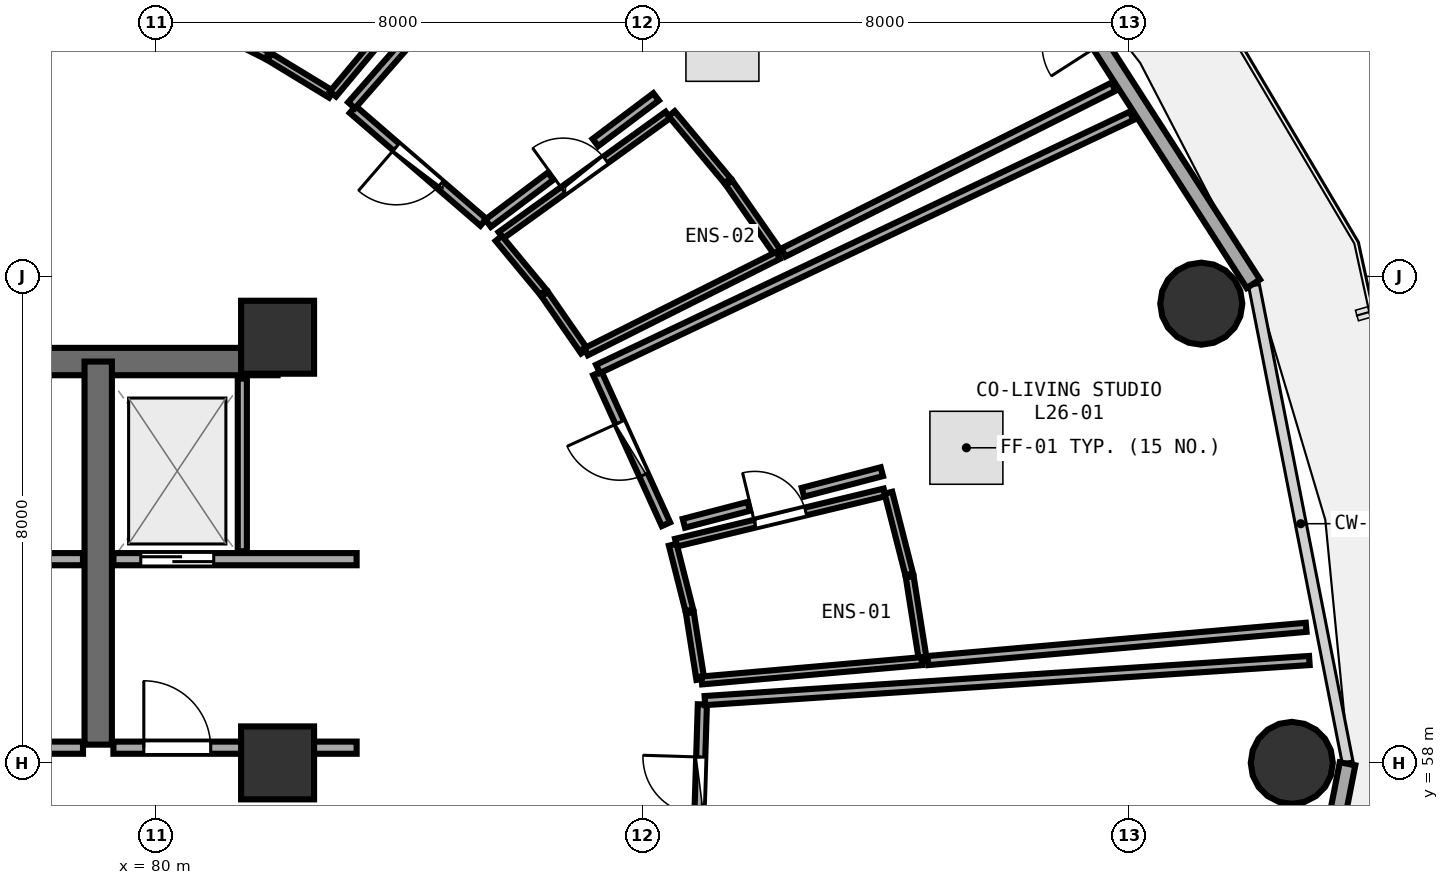
"""IFC4 building model, lengths in metres.
Left out: names, types, materials, properties, quantities, classifications, styles, units other than length and angle.
Written with IfcOpenShell. Run it as: python <this file> out.ifc"""

import sys

from ifc_helpers import new_model, si_unit, direction, frame, frame_2d, origin, origin_2d, place, context, subcontext, project, spatial, rectangle, circle, extrude, element, fill, save


model = new_model("IFC4")
c1 = context("Model", 3, precision=1e-05, world=origin(), true_north=direction((0.0, 1.0)))
c2 = subcontext(c1, "Body", "Model", "MODEL_VIEW")
j1 = project(units=[si_unit("LENGTHUNIT", "METRE"), si_unit("PLANEANGLEUNIT", "RADIAN")], contexts=[c1])
p1 = place(None, origin())
s1 = spatial("IfcSite", under=j1, at=p1, CompositionType="ELEMENT")
p2 = place(p1, origin())
s2 = spatial("IfcBuilding", under=s1, at=p2, CompositionType="ELEMENT")
p3 = place(p2, frame((0.0, 0.0, 102.6)))
s3 = spatial("IfcBuildingStorey", under=s2, at=p3, CompositionType="ELEMENT", Elevation=102.6)
for number, where, z_axis, x_axis in (
    (1, (82.0, 58.0, 0.0), (0.0, 0.0, 1.0), (1.0, 0.0, 0.0)),
    (2, (82.0, 65.0, 0.0), (0.0, 0.0, 1.0), (1.0, 0.0, 0.0)),
):
    element("IfcColumn", number, at=place(p3, frame(where, z_axis=z_axis, x_axis=x_axis)), inside=s3, PredefinedType="PILASTER", context=c2, shape_type="SweptSolid", body=[
        extrude(rectangle(XDim=1.2, YDim=1.2, at=origin_2d()), origin(), (0.0, 0.0, 1.0), 3.75),
    ])
for number, where, z_axis, x_axis in (
    (3, (98.68, 58.0, 0.0), (0.0, 0.0, 1.0), (1.0, 0.0, 0.0)),
    (4, (97.192, 65.552, 0.0), (0.0, 0.0, 1.0), (1.0, 0.0, 0.0)),
):
    element("IfcColumn", number, at=place(p3, frame(where, z_axis=z_axis, x_axis=x_axis)), inside=s3, PredefinedType="COLUMN", context=c2, shape_type="SweptSolid", body=[
        extrude(circle(Radius=0.675, at=origin_2d()), origin(), (0.0, 0.0, 1.0), 3.75),
    ])
p4 = place(p3, frame((98.048, 65.879, 0.0), z_axis=(0.0, 0.0, 1.0), x_axis=(-0.540620528459, 0.841266571432, 0.0)))
e5 = element("IfcWall", 5, at=p4, inside=s3, PredefinedType="SOLIDWALL", context=c2, shape_type="SweptSolid", body=[
    extrude(rectangle(XDim=8.193, YDim=0.26, at=frame_2d((4.096, 0.0))), origin(), (0.0, 0.0, 1.0), 3.475),
])
p5 = place(p4, frame((4.671, 0.0, 0.0)))
e6 = element("IfcOpeningElement", 6, at=p5, cuts=e5, PredefinedType="OPENING", context=c2, shape_type="SweptSolid", body=[
    extrude(rectangle(XDim=0.95, YDim=2.1, at=frame_2d((0.475, 1.05))), frame((0.0, 0.14, 0.0), z_axis=(0.0, -1.0, 0.0), x_axis=(1.0, 0.0, 0.0)), (0.0, 0.0, 1.0), 0.28),
])
p6 = place(p4, frame((5.971, 0.0, 0.85)))
e7 = element("IfcOpeningElement", 7, at=p6, cuts=e5, PredefinedType="OPENING", context=c2, shape_type="SweptSolid", body=[
    extrude(rectangle(XDim=1.2, YDim=1.45, at=frame_2d((0.6, 0.725))), frame((0.0, 0.14, 0.0), z_axis=(0.0, -1.0, 0.0), x_axis=(1.0, 0.0, 0.0)), (0.0, 0.0, 1.0), 0.28),
])
p7 = place(p3, frame((98.059, 50.148, 0.0), z_axis=(0.0, 0.0, 1.0), x_axis=(0.192581843632, 0.981280914674, 0.0)))
e8 = element("IfcWall", 8, at=p7, inside=s3, PredefinedType="SOLIDWALL", context=c2, shape_type="SweptSolid", body=[
    extrude(rectangle(XDim=7.987, YDim=0.26, at=frame_2d((3.993, 0.0))), origin(), (0.0, 0.0, 1.0), 3.475),
])
p8 = place(p7, frame((3.193, 0.0, 0.85)))
e9 = element("IfcOpeningElement", 9, at=p8, cuts=e8, PredefinedType="OPENING", context=c2, shape_type="SweptSolid", body=[
    extrude(rectangle(XDim=1.6, YDim=1.45, at=frame_2d((0.8, 0.725))), frame((0.0, 0.14, 0.0), z_axis=(0.0, -1.0, 0.0), x_axis=(1.0, 0.0, 0.0)), (0.0, 0.0, 1.0), 0.28),
])
p9 = place(p3, frame((74.0, 64.6, 0.0), z_axis=(0.0, 0.0, 1.0), x_axis=(1.0, 0.0, 0.0)))
e10 = element("IfcWall", 10, at=p9, inside=s3, PredefinedType="SHEAR", context=c2, shape_type="SweptSolid", body=[
    extrude(rectangle(XDim=8.0, YDim=0.45, at=frame_2d((4.0, 0.0))), origin(), (0.0, 0.0, 1.0), 3.49),
])
p10 = place(p3, frame((79.05, 58.3, 0.0), z_axis=(0.0, 0.0, 1.0), x_axis=(0.0, 1.0, 0.0)))
e11 = element("IfcWall", 11, at=p10, inside=s3, PredefinedType="SHEAR", context=c2, shape_type="SweptSolid", body=[
    extrude(rectangle(XDim=6.3, YDim=0.45, at=frame_2d((3.15, 0.0))), origin(), (0.0, 0.0, 1.0), 3.49),
])
p11 = place(p3, frame((74.2, 61.35, 0.0), z_axis=(0.0, 0.0, 1.0), x_axis=(1.0, 0.0, 0.0)))
e12 = element("IfcWall", 12, at=p11, inside=s3, PredefinedType="SOLIDWALL", context=c2, shape_type="SweptSolid", body=[
    extrude(rectangle(XDim=4.6, YDim=0.2, at=frame_2d((2.3, 0.0))), origin(), (0.0, 0.0, 1.0), 3.48),
])
p12 = place(p11, frame((0.52, 0.0, 0.0)))
e13 = element("IfcOpeningElement", 13, at=p12, cuts=e12, PredefinedType="OPENING", context=c2, shape_type="SweptSolid", body=[
    extrude(rectangle(XDim=1.2, YDim=2.15, at=frame_2d((0.6, 1.075))), frame((0.0, 0.11, 0.0), z_axis=(0.0, -1.0, 0.0), x_axis=(1.0, 0.0, 0.0)), (0.0, 0.0, 1.0), 0.22),
])
p13 = place(p3, frame((79.3, 61.35, 0.0), z_axis=(0.0, 0.0, 1.0), x_axis=(1.0, 0.0, 0.0)))
e14 = element("IfcWall", 14, at=p13, inside=s3, PredefinedType="SOLIDWALL", context=c2, shape_type="SweptSolid", body=[
    extrude(rectangle(XDim=4.0, YDim=0.2, at=frame_2d((2.0, 0.0))), origin(), (0.0, 0.0, 1.0), 2.775),
])
p14 = place(p13, frame((0.45, 0.0, 0.0)))
e15 = element("IfcOpeningElement", 15, at=p14, cuts=e14, PredefinedType="OPENING", context=c2, shape_type="SweptSolid", body=[
    extrude(rectangle(XDim=1.2, YDim=2.15, at=frame_2d((0.6, 1.075))), frame((0.0, 0.11, 0.0), z_axis=(0.0, -1.0, 0.0), x_axis=(1.0, 0.0, 0.0)), (0.0, 0.0, 1.0), 0.22),
])
p15 = place(p3, frame((81.42, 61.48, 0.0), z_axis=(0.0, 0.0, 1.0), x_axis=(0.0, 1.0, 0.0)))
e16 = element("IfcWall", 16, at=p15, inside=s3, PredefinedType="PARTITIONING", context=c2, shape_type="SweptSolid", body=[
    extrude(rectangle(XDim=2.84, YDim=0.15, at=frame_2d((1.42, 0.0))), origin(), (0.0, 0.0, 1.0), 3.48),
])
p16 = place(p3, frame((74.2, 58.25, 0.0), z_axis=(0.0, 0.0, 1.0), x_axis=(1.0, 0.0, 0.0)))
e17 = element("IfcWall", 17, at=p16, inside=s3, PredefinedType="SOLIDWALL", context=c2, shape_type="SweptSolid", body=[
    extrude(rectangle(XDim=4.6, YDim=0.2, at=frame_2d((2.3, 0.0))), origin(), (0.0, 0.0, 1.0), 3.48),
])
p17 = place(p16, frame((1.8, 0.0, 0.0)))
e18 = element("IfcOpeningElement", 18, at=p17, cuts=e17, PredefinedType="OPENING", context=c2, shape_type="SweptSolid", body=[
    extrude(rectangle(XDim=1.1, YDim=2.1, at=frame_2d((0.55, 1.05))), frame((0.0, 0.11, 0.0), z_axis=(0.0, -1.0, 0.0), x_axis=(1.0, 0.0, 0.0)), (0.0, 0.0, 1.0), 0.22),
])
p18 = place(p3, frame((79.3, 58.25, 0.0), z_axis=(0.0, 0.0, 1.0), x_axis=(1.0, 0.0, 0.0)))
e19 = element("IfcWall", 19, at=p18, inside=s3, PredefinedType="SOLIDWALL", context=c2, shape_type="SweptSolid", body=[
    extrude(rectangle(XDim=4.0, YDim=0.2, at=frame_2d((2.0, 0.0))), origin(), (0.0, 0.0, 1.0), 2.775),
])
p19 = place(p18, frame((0.5, 0.0, 0.0)))
e20 = element("IfcOpeningElement", 20, at=p19, cuts=e19, PredefinedType="OPENING", context=c2, shape_type="SweptSolid", body=[
    extrude(rectangle(XDim=1.1, YDim=2.1, at=frame_2d((0.55, 1.05))), frame((0.0, 0.11, 0.0), z_axis=(0.0, -1.0, 0.0), x_axis=(1.0, 0.0, 0.0)), (0.0, 0.0, 1.0), 0.22),
])
p20 = place(p3, frame((88.552, 61.621, 0.0), z_axis=(0.0, 0.0, 1.0), x_axis=(0.972155080707, 0.234338428465, 0.0)))
e21 = element("IfcWall", 21, at=p20, inside=s3, PredefinedType="PLUMBINGWALL", context=c2, shape_type="SweptSolid", body=[
    extrude(rectangle(XDim=3.529, YDim=0.13, at=frame_2d((1.764, 0.0))), origin(), (0.0, 0.0, 1.0), 3.175),
])
p21 = place(p20, frame((1.334, 0.0, 0.0)))
e22 = element("IfcOpeningElement", 22, at=p21, cuts=e21, PredefinedType="OPENING", context=c2, shape_type="SweptSolid", body=[
    extrude(rectangle(XDim=0.86, YDim=2.05, at=frame_2d((0.43, 1.025))), frame((0.0, 0.075, 0.0), z_axis=(0.0, -1.0, 0.0), x_axis=(1.0, 0.0, 0.0)), (0.0, 0.0, 1.0), 0.15),
])
p22 = place(p3, frame((88.387, 61.925, 0.0), z_axis=(0.0, 0.0, 1.0), x_axis=(-0.413748987938, 0.910391001153, 0.0)))
e23 = element("IfcWall", 23, at=p22, inside=s3, PredefinedType="PARTITIONING", context=c2, shape_type="SweptSolid", body=[
    extrude(rectangle(XDim=2.727, YDim=0.15, at=frame_2d((1.364, 0.0))), origin(), (0.0, 0.0, 1.0), 3.235),
])
p23 = place(p22, frame((0.889, 0.0, 0.0)))
e24 = element("IfcOpeningElement", 24, at=p23, cuts=e23, PredefinedType="OPENING", context=c2, shape_type="SweptSolid", body=[
    extrude(rectangle(XDim=0.95, YDim=2.08, at=frame_2d((0.475, 1.04))), frame((0.0, 0.085, 0.0), z_axis=(0.0, -1.0, 0.0), x_axis=(1.0, 0.0, 0.0)), (0.0, 0.0, 1.0), 0.17),
])
p24 = place(p3, frame((85.673, 66.676, 0.0), z_axis=(0.0, 0.0, 1.0), x_axis=(0.811192287952, 0.584779507137, 0.0)))
e25 = element("IfcWall", 25, at=p24, inside=s3, PredefinedType="PLUMBINGWALL", context=c2, shape_type="SweptSolid", body=[
    extrude(rectangle(XDim=3.386, YDim=0.13, at=frame_2d((1.693, 0.0))), origin(), (0.0, 0.0, 1.0), 3.235),
])
p25 = place(p24, frame((1.263, 0.0, 0.0)))
e26 = element("IfcOpeningElement", 26, at=p25, cuts=e25, PredefinedType="OPENING", context=c2, shape_type="SweptSolid", body=[
    extrude(rectangle(XDim=0.86, YDim=2.05, at=frame_2d((0.43, 1.025))), frame((0.0, 0.075, 0.0), z_axis=(0.0, -1.0, 0.0), x_axis=(1.0, 0.0, 0.0)), (0.0, 0.0, 1.0), 0.15),
])
p26 = place(p3, frame((85.385, 66.89, 0.0), z_axis=(0.0, 0.0, 1.0), x_axis=(-0.756913909666, 0.65351460072, 0.0)))
e27 = element("IfcWall", 27, at=p26, inside=s3, PredefinedType="PARTITIONING", context=c2, shape_type="SweptSolid", body=[
    extrude(rectangle(XDim=2.838, YDim=0.15, at=frame_2d((1.419, 0.0))), origin(), (0.0, 0.0, 1.0), 2.925),
])
p27 = place(p26, frame((0.944, 0.0, 0.0)))
e28 = element("IfcOpeningElement", 28, at=p27, cuts=e27, PredefinedType="OPENING", context=c2, shape_type="SweptSolid", body=[
    extrude(rectangle(XDim=0.95, YDim=2.08, at=frame_2d((0.475, 1.04))), frame((0.0, 0.085, 0.0), z_axis=(0.0, -1.0, 0.0), x_axis=(1.0, 0.0, 0.0)), (0.0, 0.0, 1.0), 0.17),
])
p28 = place(p3, frame((88.903, 56.28, 0.0), z_axis=(0.0, 0.0, 1.0), x_axis=(0.031027384649, 0.999518534797, 0.0)))
e29 = element("IfcWall", 29, at=p28, inside=s3, PredefinedType="PARTITIONING", context=c2, shape_type="SweptSolid", body=[
    extrude(rectangle(XDim=2.683, YDim=0.15, at=frame_2d((1.342, 0.0))), origin(), (0.0, 0.0, 1.0), 2.925),
])
p29 = place(p28, frame((0.867, 0.0, 0.0)))
e30 = element("IfcOpeningElement", 30, at=p29, cuts=e29, PredefinedType="OPENING", context=c2, shape_type="SweptSolid", body=[
    extrude(rectangle(XDim=0.95, YDim=2.08, at=frame_2d((0.475, 1.04))), frame((0.0, 0.085, 0.0), z_axis=(0.0, -1.0, 0.0), x_axis=(1.0, 0.0, 0.0)), (0.0, 0.0, 1.0), 0.17),
])
p30 = place(p3, frame((88.953, 59.374, 0.0), z_axis=(0.0, 0.0, 1.0), x_axis=(-0.15586083115, 0.987779024536, 0.0)))
e31 = element("IfcWall", 31, at=p30, inside=s3, PredefinedType="PLUMBINGWALL", context=c2, shape_type="SweptSolid", body=[
    extrude(rectangle(XDim=1.109, YDim=0.13, at=frame_2d((0.555, 0.0))), origin(), (0.0, 0.0, 1.0), 3.48),
])
p31 = place(p3, frame((88.772, 60.508, 0.0), z_axis=(0.0, 0.0, 1.0), x_axis=(-0.245578364709, 0.96937674141, 0.0)))
e32 = element("IfcWall", 32, at=p31, inside=s3, PredefinedType="PLUMBINGWALL", context=c2, shape_type="SweptSolid", body=[
    extrude(rectangle(XDim=1.114, YDim=0.13, at=frame_2d((0.557, 0.0))), origin(), (0.0, 0.0, 1.0), 3.48),
])
p32 = place(p3, frame((92.046, 62.443, 0.0), z_axis=(0.0, 0.0, 1.0), x_axis=(0.246925879087, -0.969034369998, 0.0)))
e33 = element("IfcWall", 33, at=p32, inside=s3, PredefinedType="PLUMBINGWALL", context=c2, shape_type="SweptSolid", body=[
    extrude(rectangle(XDim=1.386, YDim=0.13, at=frame_2d((0.693, 0.0))), origin(), (0.0, 0.0, 1.0), 3.48),
])
p33 = place(p3, frame((92.396, 61.06, 0.0), z_axis=(0.0, 0.0, 1.0), x_axis=(0.156116740912, -0.987738610771, 0.0)))
e34 = element("IfcWall", 34, at=p33, inside=s3, PredefinedType="PLUMBINGWALL", context=c2, shape_type="SweptSolid", body=[
    extrude(rectangle(XDim=1.382, YDim=0.13, at=frame_2d((0.691, 0.0))), origin(), (0.0, 0.0, 1.0), 3.48),
])
p34 = place(p3, frame((92.595, 59.673, 0.0), z_axis=(0.0, 0.0, 1.0), x_axis=(-0.996171439416, -0.087421183317, 0.0)))
e35 = element("IfcWall", 35, at=p34, inside=s3, PredefinedType="PLUMBINGWALL", context=c2, shape_type="SweptSolid", body=[
    extrude(rectangle(XDim=3.633, YDim=0.13, at=frame_2d((1.817, 0.0))), origin(), (0.0, 0.0, 1.0), 3.175),
])
p35 = place(p3, frame((87.27, 64.479, 0.0), z_axis=(0.0, 0.0, 1.0), x_axis=(0.903543765611, 0.428495815178, 0.0)))
e36 = element("IfcWall", 36, at=p35, inside=s3, PredefinedType="PARTITIONING", context=c2, shape_type="SweptSolid", body=[
    extrude(rectangle(XDim=9.713, YDim=0.15, at=frame_2d((4.856, 0.0))), origin(), (0.0, 0.0, 1.0), 2.925),
])
p36 = place(p3, frame((98.916, 60.229, 0.0), z_axis=(0.0, 0.0, 1.0), x_axis=(-0.996158887303, -0.08756409793, 0.0)))
e37 = element("IfcWall", 37, at=p36, inside=s3, PredefinedType="PARTITIONING", context=c2, shape_type="SweptSolid", body=[
    extrude(rectangle(XDim=6.245, YDim=0.15, at=frame_2d((3.123, 0.0))), origin(), (0.0, 0.0, 1.0), 2.975),
])
p37 = place(p3, frame((91.938, 62.789, 0.0), z_axis=(0.0, 0.0, 1.0), x_axis=(-0.967708049996, -0.252073659816, 0.0)))
e38 = element("IfcWall", 38, at=p37, inside=s3, PredefinedType="PARTITIONING", context=c2, shape_type="SweptSolid", body=[
    extrude(rectangle(XDim=1.341, YDim=0.15, at=frame_2d((0.671, 0.0))), origin(), (0.0, 0.0, 1.0), 3.175),
])
p38 = place(p3, frame((89.75, 62.219, 0.0), z_axis=(0.0, 0.0, 1.0), x_axis=(-0.96768541666, -0.252160532962, 0.0)))
e39 = element("IfcWall", 39, at=p38, inside=s3, PredefinedType="PARTITIONING", context=c2, shape_type="SweptSolid", body=[
    extrude(rectangle(XDim=1.103, YDim=0.15, at=frame_2d((0.551, 0.0))), origin(), (0.0, 0.0, 1.0), 3.48),
])
p39 = place(p3, frame((87.045, 64.769, 0.0), z_axis=(0.0, 0.0, 1.0), x_axis=(-0.569710294604, 0.821845593906, 0.0)))
e40 = element("IfcWall", 40, at=p39, inside=s3, PredefinedType="PLUMBINGWALL", context=c2, shape_type="SweptSolid", body=[
    extrude(rectangle(XDim=1.142, YDim=0.13, at=frame_2d((0.571, 0.0))), origin(), (0.0, 0.0, 1.0), 2.925),
])
p40 = place(p3, frame((86.37, 65.74, 0.0), z_axis=(0.0, 0.0, 1.0), x_axis=(-0.63765459476, 0.770322411579, 0.0)))
e41 = element("IfcWall", 41, at=p40, inside=s3, PredefinedType="PLUMBINGWALL", context=c2, shape_type="SweptSolid", body=[
    extrude(rectangle(XDim=1.15, YDim=0.13, at=frame_2d((0.575, 0.0))), origin(), (0.0, 0.0, 1.0), 3.48),
])
p41 = place(p3, frame((88.481, 68.676, 0.0), z_axis=(0.0, 0.0, 1.0), x_axis=(0.640685734907, -0.767803222894, 0.0)))
e42 = element("IfcWall", 42, at=p41, inside=s3, PredefinedType="PLUMBINGWALL", context=c2, shape_type="SweptSolid", body=[
    extrude(rectangle(XDim=1.437, YDim=0.13, at=frame_2d((0.718, 0.0))), origin(), (0.0, 0.0, 1.0), 3.48),
])
p42 = place(p3, frame((89.425, 67.541, 0.0), z_axis=(0.0, 0.0, 1.0), x_axis=(0.571009238548, -0.820943633566, 0.0)))
e43 = element("IfcWall", 43, at=p42, inside=s3, PredefinedType="PLUMBINGWALL", context=c2, shape_type="SweptSolid", body=[
    extrude(rectangle(XDim=1.424, YDim=0.13, at=frame_2d((0.712, 0.0))), origin(), (0.0, 0.0, 1.0), 3.48),
])
p43 = place(p3, frame((90.232, 66.346, 0.0), z_axis=(0.0, 0.0, 1.0), x_axis=(-0.893873710096, -0.448318849034, 0.0)))
e44 = element("IfcWall", 44, at=p43, inside=s3, PredefinedType="PLUMBINGWALL", context=c2, shape_type="SweptSolid", body=[
    extrude(rectangle(XDim=3.533, YDim=0.13, at=frame_2d((1.767, 0.0))), origin(), (0.0, 0.0, 1.0), 2.925),
])
p44 = place(p3, frame((83.217, 68.814, 0.0), z_axis=(0.0, 0.0, 1.0), x_axis=(0.659635901966, 0.751585309088, 0.0)))
e45 = element("IfcWall", 45, at=p44, inside=s3, PredefinedType="PARTITIONING", context=c2, shape_type="SweptSolid", body=[
    extrude(rectangle(XDim=9.237, YDim=0.15, at=frame_2d((4.619, 0.0))), origin(), (0.0, 0.0, 1.0), 2.925),
])
p45 = place(p3, frame((95.749, 69.12, 0.0), z_axis=(0.0, 0.0, 1.0), x_axis=(-0.89358164897, -0.448900697954, 0.0)))
e46 = element("IfcWall", 46, at=p45, inside=s3, PredefinedType="PARTITIONING", context=c2, shape_type="SweptSolid", body=[
    extrude(rectangle(XDim=6.075, YDim=0.15, at=frame_2d((3.038, 0.0))), origin(), (0.0, 0.0, 1.0), 2.975),
])
p46 = place(p3, frame((88.225, 68.953, 0.0), z_axis=(0.0, 0.0, 1.0), x_axis=(-0.799225323022, -0.601031515846, 0.0)))
e47 = element("IfcWall", 47, at=p46, inside=s3, PredefinedType="PARTITIONING", context=c2, shape_type="SweptSolid", body=[
    extrude(rectangle(XDim=1.249, YDim=0.15, at=frame_2d((0.625, 0.0))), origin(), (0.0, 0.0, 1.0), 2.925),
])
p47 = place(p3, frame((86.491, 67.649, 0.0), z_axis=(0.0, 0.0, 1.0), x_axis=(-0.799180360415, -0.601091300492, 0.0)))
e48 = element("IfcWall", 48, at=p47, inside=s3, PredefinedType="PARTITIONING", context=c2, shape_type="SweptSolid", body=[
    extrude(rectangle(XDim=1.288, YDim=0.15, at=frame_2d((0.644, 0.0))), origin(), (0.0, 0.0, 1.0), 3.235),
])
p48 = place(p3, frame((82.881, 68.995, 0.0), z_axis=(0.0, 0.0, 1.0), x_axis=(-0.854269908405, 0.51982970634, 0.0)))
e49 = element("IfcWall", 49, at=p48, inside=s3, PredefinedType="PLUMBINGWALL", context=c2, shape_type="SweptSolid", body=[
    extrude(rectangle(XDim=1.189, YDim=0.13, at=frame_2d((0.595, 0.0))), origin(), (0.0, 0.0, 1.0), 3.48),
])
p49 = place(p3, frame((81.83, 69.633, 0.0), z_axis=(0.0, 0.0, 1.0), x_axis=(-0.89291318054, 0.450228888475, 0.0)))
e50 = element("IfcWall", 50, at=p49, inside=s3, PredefinedType="PLUMBINGWALL", context=c2, shape_type="SweptSolid", body=[
    extrude(rectangle(XDim=1.197, YDim=0.13, at=frame_2d((0.599, 0.0))), origin(), (0.0, 0.0, 1.0), 2.925),
])
p50 = place(p3, frame((85.062, 71.576, 0.0), z_axis=(0.0, 0.0, 1.0), x_axis=(-0.641092758396, -0.767463403123, 0.0)))
e51 = element("IfcWall", 51, at=p50, inside=s3, PredefinedType="PLUMBINGWALL", context=c2, shape_type="SweptSolid", body=[
    extrude(rectangle(XDim=3.356, YDim=0.13, at=frame_2d((1.678, 0.0))), origin(), (0.0, 0.0, 1.0), 2.925),
])
p51 = place(p3, frame((89.028, 59.025, 0.0), z_axis=(0.0, 0.0, 1.0), x_axis=(0.997812074352, 0.066114024819, 0.0)))
e52 = element("IfcWall", 52, at=p51, inside=s3, PredefinedType="PARTITIONING", context=c2, shape_type="SweptSolid", body=[
    extrude(rectangle(XDim=9.963, YDim=0.15, at=frame_2d((4.981, 0.0))), origin(), (0.0, 0.0, 1.0), 2.975),
])
p52 = place(p14, origin())
e53 = element("IfcDoor", 53, at=p52, inside=s3, OperationType="DOUBLE_DOOR_SLIDING", PredefinedType="DOOR", context=c2, shape_type="SweptSolid", body=[
    extrude(rectangle(XDim=1.2, YDim=2.15, at=frame_2d((0.6, 1.075))), frame((0.0, 0.025, 0.0), z_axis=(0.0, -1.0, 0.0), x_axis=(1.0, 0.0, 0.0)), (0.0, 0.0, 1.0), 0.05),
])
fill(e15, e53)
p53 = place(p19, frame((1.1, 0.0, 0.0), z_axis=(0.0, 0.0, 1.0), x_axis=(-1.0, 0.0, 0.0)))
e54 = element("IfcDoor", 54, at=p53, inside=s3, OperationType="SINGLE_SWING_RIGHT", PredefinedType="DOOR", context=c2, shape_type="SweptSolid", body=[
    extrude(rectangle(XDim=1.1, YDim=2.1, at=frame_2d((0.55, 1.05))), frame((0.0, 0.025, 0.0), z_axis=(0.0, -1.0, 0.0), x_axis=(1.0, 0.0, 0.0)), (0.0, 0.0, 1.0), 0.05),
])
fill(e20, e54)
p54 = place(p21, origin())
e55 = element("IfcDoor", 55, at=p54, inside=s3, OperationType="SINGLE_SWING_LEFT", PredefinedType="DOOR", context=c2, shape_type="SweptSolid", body=[
    extrude(rectangle(XDim=0.86, YDim=2.05, at=frame_2d((0.43, 1.025))), frame((0.0, 0.025, 0.0), z_axis=(0.0, -1.0, 0.0), x_axis=(1.0, 0.0, 0.0)), (0.0, 0.0, 1.0), 0.05),
])
fill(e22, e55)
p55 = place(p23, origin())
e56 = element("IfcDoor", 56, at=p55, inside=s3, OperationType="SINGLE_SWING_RIGHT", PredefinedType="DOOR", context=c2, shape_type="SweptSolid", body=[
    extrude(rectangle(XDim=0.95, YDim=2.08, at=frame_2d((0.475, 1.04))), frame((0.0, 0.025, 0.0), z_axis=(0.0, -1.0, 0.0), x_axis=(1.0, 0.0, 0.0)), (0.0, 0.0, 1.0), 0.05),
])
fill(e24, e56)
p56 = place(p25, origin())
e57 = element("IfcDoor", 57, at=p56, inside=s3, OperationType="SINGLE_SWING_LEFT", PredefinedType="DOOR", context=c2, shape_type="SweptSolid", body=[
    extrude(rectangle(XDim=0.86, YDim=2.05, at=frame_2d((0.43, 1.025))), frame((0.0, 0.025, 0.0), z_axis=(0.0, -1.0, 0.0), x_axis=(1.0, 0.0, 0.0)), (0.0, 0.0, 1.0), 0.05),
])
fill(e26, e57)
p57 = place(p27, origin())
e58 = element("IfcDoor", 58, at=p57, inside=s3, OperationType="SINGLE_SWING_RIGHT", PredefinedType="DOOR", context=c2, shape_type="SweptSolid", body=[
    extrude(rectangle(XDim=0.95, YDim=2.08, at=frame_2d((0.475, 1.04))), frame((0.0, 0.025, 0.0), z_axis=(0.0, -1.0, 0.0), x_axis=(1.0, 0.0, 0.0)), (0.0, 0.0, 1.0), 0.05),
])
fill(e28, e58)
p58 = place(p29, origin())
e59 = element("IfcDoor", 59, at=p58, inside=s3, OperationType="SINGLE_SWING_RIGHT", PredefinedType="DOOR", context=c2, shape_type="SweptSolid", body=[
    extrude(rectangle(XDim=0.95, YDim=2.08, at=frame_2d((0.475, 1.04))), frame((0.0, 0.025, 0.0), z_axis=(0.0, -1.0, 0.0), x_axis=(1.0, 0.0, 0.0)), (0.0, 0.0, 1.0), 0.05),
])
fill(e30, e59)
save(model, sys.argv[1])
